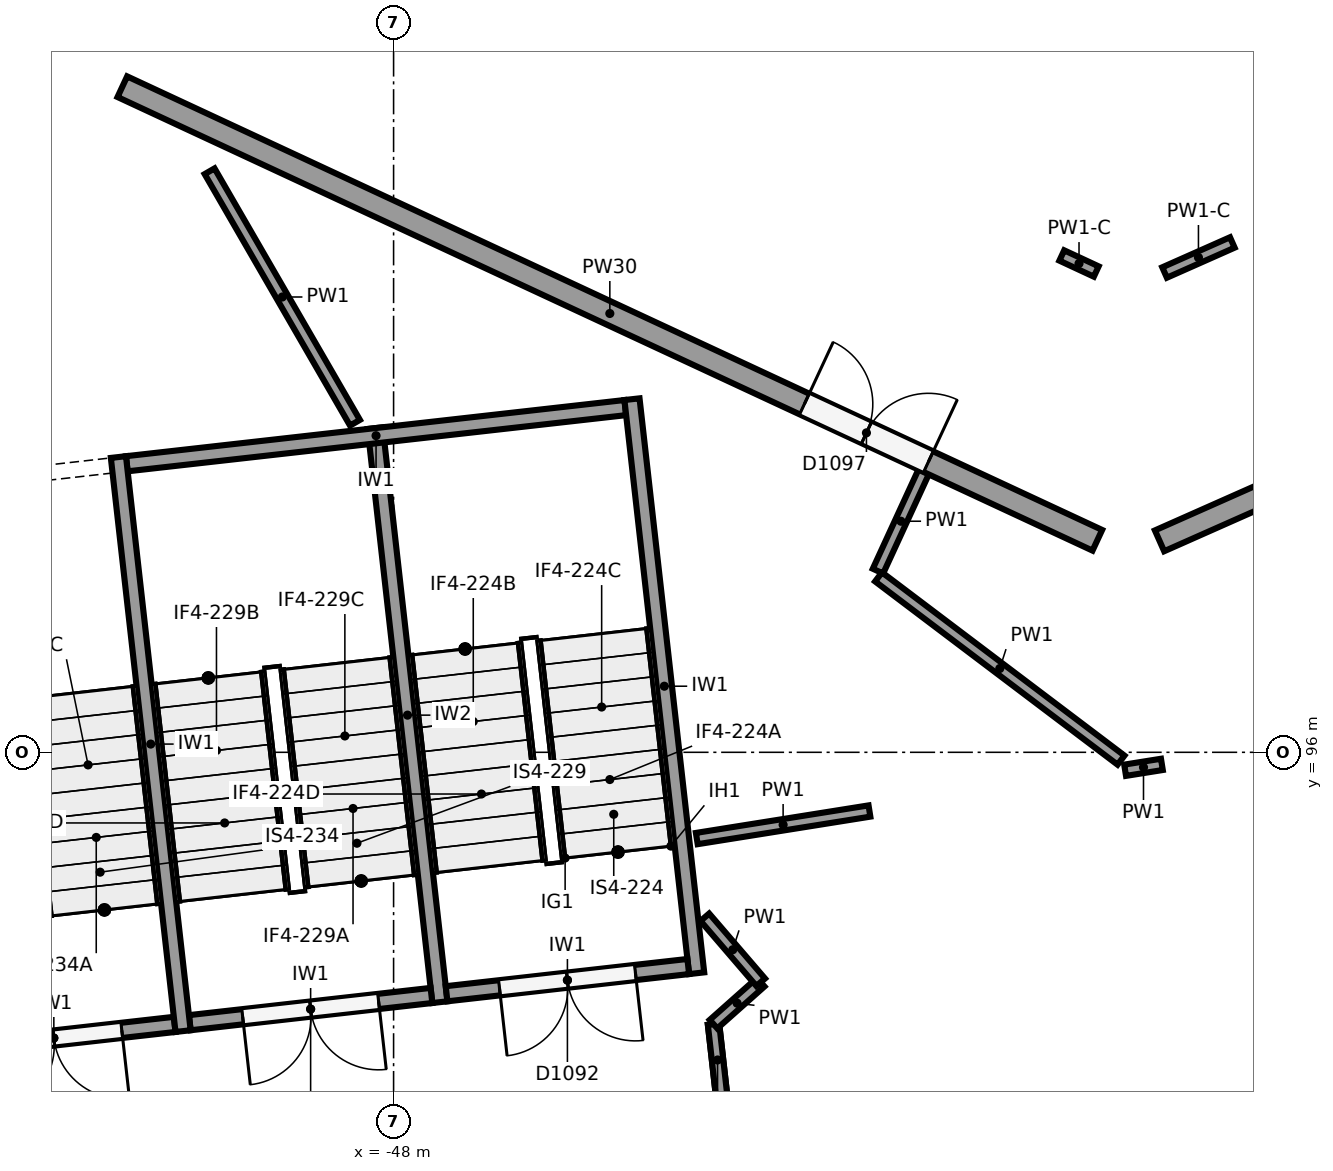
"""IFC4 building model, lengths in metres.
Left out: names, types, materials, properties, quantities, classifications, styles, units other than length and angle.
Written with IfcOpenShell. Run it as: python <this file> out.ifc"""

import sys

from ifc_helpers import new_model, si_unit, direction, frame, frame_2d, origin, origin_2d, place, context, subcontext, project, spatial, rectangle, circle, extrude, element, fill, save


model = new_model("IFC4")
c1 = context("Model", 3, precision=1e-05, world=origin(), true_north=direction((0.0, 1.0)))
c2 = subcontext(c1, "Body", "Model", "MODEL_VIEW")
j1 = project(units=[si_unit("LENGTHUNIT", "METRE"), si_unit("PLANEANGLEUNIT", "RADIAN")], contexts=[c1])
p1 = place(None, origin())
s1 = spatial("IfcSite", under=j1, at=p1, CompositionType="ELEMENT")
p2 = place(p1, origin())
s2 = spatial("IfcBuilding", under=s1, at=p2, CompositionType="ELEMENT")
p3 = place(p2, frame((0.0, 0.0, 12.0)))
s3 = spatial("IfcBuildingStorey", under=s2, at=p3, CompositionType="ELEMENT", Elevation=12.0)
p4 = place(p3, frame((-38.333, 98.6, 0.0), z_axis=(0.0, 0.0, 1.0), x_axis=(1.0, 0.0, 0.0)))
e1 = element("IfcColumn", 1, at=p4, inside=s3, PredefinedType="COLUMN", context=c2, shape_type="SweptSolid", body=[
    extrude(circle(Radius=0.45, at=origin_2d()), origin(), (0.0, 0.0, 1.0), 6.0),
])
p5 = place(p3, frame((-44.683, 91.091, 0.0), z_axis=(0.0, 0.0, 1.0), x_axis=(1.0, 0.0, 0.0)))
e2 = element("IfcColumn", 2, at=p5, inside=s3, PredefinedType="COLUMN", context=c2, shape_type="SweptSolid", body=[
    extrude(circle(Radius=0.55, at=origin_2d()), origin(), (0.0, 0.0, 1.0), 6.0),
])
p6 = place(p3, frame((-52.203, 105.052, 0.0), z_axis=(0.0, 0.0, 1.0), x_axis=(1.0, 0.0, 0.0)))
e3 = element("IfcColumn", 3, at=p6, inside=s3, PredefinedType="COLUMN", context=c2, shape_type="SweptSolid", body=[
    extrude(circle(Radius=0.7, at=origin_2d()), origin(), (0.0, 0.0, 1.0), 6.0),
])
p7 = place(p3, frame((-38.333, 102.6, 0.0), z_axis=(0.0, 0.0, 1.0), x_axis=(1.0, 0.0, 0.0)))
e4 = element("IfcColumn", 4, at=p7, inside=s3, PredefinedType="COLUMN", context=c2, shape_type="SweptSolid", body=[
    extrude(circle(Radius=0.4, at=origin_2d()), origin(), (0.0, 0.0, 1.0), 6.0),
])
p8 = place(p3, frame((-37.922, 98.782, 0.0), z_axis=(0.0, 0.0, 1.0), x_axis=(0.914138897099, 0.405401130748, 0.0)))
e5 = element("IfcWall", 5, at=p8, inside=s3, PredefinedType="SOLIDWALL", context=c2, shape_type="SweptSolid", body=[
    extrude(rectangle(XDim=15.824, YDim=0.3, at=frame_2d((7.912, 0.0))), origin(), (0.0, 0.0, 1.0), 4.35),
])
p9 = place(p3, frame((-51.569, 104.757, 0.0), z_axis=(0.0, 0.0, 1.0), x_axis=(0.906698705786, -0.421778919491, 0.0)))
e6 = element("IfcWall", 6, at=p9, inside=s3, PredefinedType="SOLIDWALL", context=c2, shape_type="SweptSolid", body=[
    extrude(rectangle(XDim=14.148, YDim=0.3, at=frame_2d((7.074, 0.0))), origin(), (0.0, 0.0, 1.0), 4.35),
])
p10 = place(p9, frame((9.897, 0.0, 0.0)))
e7 = element("IfcOpeningElement", 7, at=p10, cuts=e6, PredefinedType="OPENING", context=c2, shape_type="SweptSolid", body=[
    extrude(rectangle(XDim=1.8, YDim=2.4, at=frame_2d((0.9, 1.2))), frame((0.0, 0.16, 0.0), z_axis=(0.0, -1.0, 0.0), x_axis=(1.0, 0.0, 0.0)), (0.0, 0.0, 1.0), 0.32),
])
p11 = place(p3, frame((-44.863, 100.646, 0.0), z_axis=(0.0, 0.0, 1.0), x_axis=(0.111951003472, -0.993713727802, 0.0)))
e8 = element("IfcWall", 8, at=p11, inside=s3, PredefinedType="SHEAR", context=c2, shape_type="SweptSolid", body=[
    extrude(rectangle(XDim=7.6, YDim=0.2, at=frame_2d((3.8, 0.0))), origin(), (0.0, 0.0, 1.0), 5.65),
])
p12 = place(p3, frame((-51.621, 99.885, 0.0), z_axis=(0.0, 0.0, 1.0), x_axis=(0.111947429915, -0.993714130389, 0.0)))
e9 = element("IfcWall", 9, at=p12, inside=s3, PredefinedType="SHEAR", context=c2, shape_type="SweptSolid", body=[
    extrude(rectangle(XDim=7.6, YDim=0.2, at=frame_2d((3.8, 0.0))), origin(), (0.0, 0.0, 1.0), 5.65),
])
for number, where, z_axis, x_axis in (
    (10, (-44.951, 100.535, 0.0), (0.0, 0.0, 1.0), (-0.994, -0.112, 0.0)),
    (11, (-51.709, 99.774, 0.0), (0.0, 0.0, 1.0), (-0.994, -0.112, 0.0)),
):
    element("IfcWall", number, at=place(p3, frame(where, z_axis=z_axis, x_axis=x_axis)), inside=s3, PredefinedType="SHEAR", context=c2, shape_type="SweptSolid", body=[
        extrude(rectangle(XDim=6.6, YDim=0.2, at=frame_2d((3.3, 0.0))), origin(), (0.0, 0.0, 1.0), 5.65),
    ])
p13 = place(p3, frame((-48.242, 100.265, 0.0), z_axis=(0.0, 0.0, 1.0), x_axis=(0.111954577255, -0.993713325176, 0.0)))
e12 = element("IfcWall", 12, at=p13, inside=s3, PredefinedType="SHEAR", context=c2, shape_type="SweptSolid", body=[
    extrude(rectangle(XDim=7.6, YDim=0.2, at=frame_2d((3.8, 0.0))), origin(), (0.0, 0.0, 1.0), 5.65),
])
p14 = place(p3, frame((-44.123, 93.182, 0.0), z_axis=(0.0, 0.0, 1.0), x_axis=(-0.993717005286, -0.11192190762, 0.0)))
e13 = element("IfcWall", 13, at=p14, inside=s3, PredefinedType="SHEAR", context=c2, shape_type="SweptSolid", body=[
    extrude(rectangle(XDim=3.2, YDim=0.2, at=frame_2d((1.6, 0.0))), origin(), (0.0, 0.0, 1.0), 5.65),
])
p15 = place(p14, frame((0.7, 0.0, 0.0)))
e14 = element("IfcOpeningElement", 14, at=p15, cuts=e13, PredefinedType="OPENING", context=c2, shape_type="SweptSolid", body=[
    extrude(rectangle(XDim=1.8, YDim=2.1, at=frame_2d((0.9, 1.05))), frame((0.0, 0.11, 0.0), z_axis=(0.0, -1.0, 0.0), x_axis=(1.0, 0.0, 0.0)), (0.0, 0.0, 1.0), 0.22),
])
p16 = place(p3, frame((-47.502, 92.801, 0.0), z_axis=(0.0, 0.0, 1.0), x_axis=(-0.993707560215, -0.112005735442, 0.0)))
e15 = element("IfcWall", 15, at=p16, inside=s3, PredefinedType="SHEAR", context=c2, shape_type="SweptSolid", body=[
    extrude(rectangle(XDim=3.2, YDim=0.2, at=frame_2d((1.6, 0.0))), origin(), (0.0, 0.0, 1.0), 5.65),
])
p17 = place(p16, frame((0.7, 0.0, 0.0)))
e16 = element("IfcOpeningElement", 16, at=p17, cuts=e15, PredefinedType="OPENING", context=c2, shape_type="SweptSolid", body=[
    extrude(rectangle(XDim=1.8, YDim=2.1, at=frame_2d((0.9, 1.05))), frame((0.0, 0.11, 0.0), z_axis=(0.0, -1.0, 0.0), x_axis=(1.0, 0.0, 0.0)), (0.0, 0.0, 1.0), 0.22),
])
p18 = place(p3, frame((-50.88, 92.42, 0.0), z_axis=(0.0, 0.0, 1.0), x_axis=(-0.993707560215, -0.112005735442, 0.0)))
e17 = element("IfcWall", 17, at=p18, inside=s3, PredefinedType="SHEAR", context=c2, shape_type="SweptSolid", body=[
    extrude(rectangle(XDim=3.2, YDim=0.2, at=frame_2d((1.6, 0.0))), origin(), (0.0, 0.0, 1.0), 5.65),
])
p19 = place(p18, frame((0.7, 0.0, 0.0)))
e18 = element("IfcOpeningElement", 18, at=p19, cuts=e17, PredefinedType="OPENING", context=c2, shape_type="SweptSolid", body=[
    extrude(rectangle(XDim=1.8, YDim=2.1, at=frame_2d((0.9, 1.05))), frame((0.0, 0.11, 0.0), z_axis=(0.0, -1.0, 0.0), x_axis=(1.0, 0.0, 0.0)), (0.0, 0.0, 1.0), 0.22),
])
p20 = place(p3, frame((-48.508, 100.336, 0.0), z_axis=(0.0, 0.0, 1.0), x_axis=(-0.500439359674, 0.865771590715, 0.0)))
e19 = element("IfcWall", 19, at=p20, inside=s3, PredefinedType="PARTITIONING", context=c2, shape_type="SweptSolid", body=[
    extrude(rectangle(XDim=3.822, YDim=0.15, at=frame_2d((1.911, 0.0))), origin(), (0.0, 0.0, 1.0), 5.65),
])
p21 = place(p3, frame((-37.891, 95.841, 0.0), z_axis=(0.0, 0.0, 1.0), x_axis=(-0.987539881519, -0.157368937247, 0.0)))
e20 = element("IfcWall", 20, at=p21, inside=s3, PredefinedType="PARTITIONING", context=c2, shape_type="SweptSolid", body=[
    extrude(rectangle(XDim=0.49, YDim=0.15, at=frame_2d((0.245, 0.0))), origin(), (0.0, 0.0, 1.0), 5.65),
])
p22 = place(p3, frame((-36.965, 102.708, 0.0), z_axis=(0.0, 0.0, 1.0), x_axis=(-0.914193086295, -0.4052789175, 0.0)))
e21 = element("IfcWall", 21, at=p22, inside=s3, PredefinedType="PARTITIONING", context=c2, shape_type="SweptSolid", body=[
    extrude(rectangle(XDim=0.975, YDim=0.15, at=frame_2d((0.488, 0.0))), origin(), (0.0, 0.0, 1.0), 5.55),
])
p23 = place(p3, frame((-38.755, 102.325, 0.0), z_axis=(0.0, 0.0, 1.0), x_axis=(-0.906755828453, 0.421656101067, 0.0)))
e22 = element("IfcWall", 22, at=p23, inside=s3, PredefinedType="PARTITIONING", context=c2, shape_type="SweptSolid", body=[
    extrude(rectangle(XDim=0.5, YDim=0.15, at=frame_2d((0.25, 0.0))), origin(), (0.0, 0.0, 1.0), 5.55),
])
p24 = place(p3, frame((-38.429, 95.897, 0.0), z_axis=(0.0, 0.0, 1.0), x_axis=(-0.797833387107, 0.602878002931, 0.0)))
e23 = element("IfcWall", 23, at=p24, inside=s3, PredefinedType="PARTITIONING", context=c2, shape_type="SweptSolid", body=[
    extrude(rectangle(XDim=3.999, YDim=0.15, at=frame_2d((1.999, 0.0))), origin(), (0.0, 0.0, 1.0), 5.65),
])
p25 = place(p3, frame((-41.627, 98.384, 0.0), z_axis=(0.0, 0.0, 1.0), x_axis=(0.418061745586, 0.908418613238, 0.0)))
e24 = element("IfcWall", 24, at=p25, inside=s3, PredefinedType="PARTITIONING", context=c2, shape_type="SweptSolid", body=[
    extrude(rectangle(XDim=1.445, YDim=0.15, at=frame_2d((0.723, 0.0))), origin(), (0.0, 0.0, 1.0), 5.65),
])
p26 = place(p3, frame((-41.739, 95.228, 0.0), z_axis=(0.0, 0.0, 1.0), x_axis=(-0.987519978733, -0.157493782745, 0.0)))
e25 = element("IfcWall", 25, at=p26, inside=s3, PredefinedType="PARTITIONING", context=c2, shape_type="SweptSolid", body=[
    extrude(rectangle(XDim=2.301, YDim=0.15, at=frame_2d((1.15, 0.0))), origin(), (0.0, 0.0, 1.0), 5.65),
])
p27 = place(p3, frame((-43.154, 86.767, 0.0), z_axis=(0.0, 0.0, 1.0), x_axis=(-0.111890590311, 0.993720532041, 0.0)))
e26 = element("IfcWall", 26, at=p27, inside=s3, PredefinedType="PARTITIONING", context=c2, shape_type="SweptSolid", body=[
    extrude(rectangle(XDim=5.693, YDim=0.15, at=frame_2d((2.846, 0.0))), origin(), (0.0, 0.0, 1.0), 4.55),
])
p28 = place(p27, frame((2.05, 0.0, 0.0)))
e27 = element("IfcOpeningElement", 27, at=p28, cuts=e26, PredefinedType="OPENING", context=c2, shape_type="SweptSolid", body=[
    extrude(rectangle(XDim=1.8, YDim=2.1, at=frame_2d((0.9, 1.05))), frame((0.0, 0.085, 0.0), z_axis=(0.0, -1.0, 0.0), x_axis=(1.0, 0.0, 0.0)), (0.0, 0.0, 1.0), 0.17),
])
p29 = place(p3, frame((-43.685, 91.481, 4.55), z_axis=(0.0, 0.0, 1.0), x_axis=(-0.111674075876, 0.99374488717, 0.0)))
e28 = element("IfcWall", 28, at=p29, inside=s3, PredefinedType="PARTITIONING", context=c2, shape_type="SweptSolid", body=[
    extrude(rectangle(XDim=0.949, YDim=0.15, at=frame_2d((0.474, 0.0))), origin(), (0.0, 0.0, 1.0), 1.1),
])
p30 = place(p3, frame((-43.791, 92.424, 0.0), z_axis=(0.0, 0.0, 1.0), x_axis=(0.747490432018, 0.664272575109, 0.0)))
e29 = element("IfcWall", 29, at=p30, inside=s3, PredefinedType="PARTITIONING", context=c2, shape_type="SweptSolid", body=[
    extrude(rectangle(XDim=0.83, YDim=0.15, at=frame_2d((0.415, 0.0))), origin(), (0.0, 0.0, 1.0), 5.65),
])
p31 = place(p3, frame((-43.17, 92.975, 0.0), z_axis=(0.0, 0.0, 1.0), x_axis=(-0.651825129524, 0.75836930352, 0.0)))
e30 = element("IfcWall", 30, at=p31, inside=s3, PredefinedType="PARTITIONING", context=c2, shape_type="SweptSolid", body=[
    extrude(rectangle(XDim=1.127, YDim=0.15, at=frame_2d((0.564, 0.0))), origin(), (0.0, 0.0, 1.0), 5.65),
])
p32 = place(p10, origin())
e31 = element("IfcDoor", 31, at=p32, inside=s3, OperationType="DOUBLE_DOOR_SINGLE_SWING", PredefinedType="DOOR", context=c2, shape_type="SweptSolid", body=[
    extrude(rectangle(XDim=1.8, YDim=2.4, at=frame_2d((0.9, 1.2))), frame((0.0, 0.025, 0.0), z_axis=(0.0, -1.0, 0.0), x_axis=(1.0, 0.0, 0.0)), (0.0, 0.0, 1.0), 0.05),
])
fill(e7, e31)
p33 = place(p15, origin())
e32 = element("IfcDoor", 32, at=p33, inside=s3, OperationType="DOUBLE_DOOR_SINGLE_SWING", PredefinedType="DOOR", context=c2, shape_type="SweptSolid", body=[
    extrude(rectangle(XDim=1.8, YDim=2.1, at=frame_2d((0.9, 1.05))), frame((0.0, 0.025, 0.0), z_axis=(0.0, -1.0, 0.0), x_axis=(1.0, 0.0, 0.0)), (0.0, 0.0, 1.0), 0.05),
])
fill(e14, e32)
p34 = place(p17, origin())
e33 = element("IfcDoor", 33, at=p34, inside=s3, OperationType="DOUBLE_DOOR_SINGLE_SWING", PredefinedType="DOOR", context=c2, shape_type="SweptSolid", body=[
    extrude(rectangle(XDim=1.8, YDim=2.1, at=frame_2d((0.9, 1.05))), frame((0.0, 0.025, 0.0), z_axis=(0.0, -1.0, 0.0), x_axis=(1.0, 0.0, 0.0)), (0.0, 0.0, 1.0), 0.05),
])
fill(e16, e33)
p35 = place(p19, origin())
e34 = element("IfcDoor", 34, at=p35, inside=s3, OperationType="DOUBLE_DOOR_SINGLE_SWING", PredefinedType="DOOR", context=c2, shape_type="SweptSolid", body=[
    extrude(rectangle(XDim=1.8, YDim=2.1, at=frame_2d((0.9, 1.05))), frame((0.0, 0.025, 0.0), z_axis=(0.0, -1.0, 0.0), x_axis=(1.0, 0.0, 0.0)), (0.0, 0.0, 1.0), 0.05),
])
fill(e18, e34)
save(model, sys.argv[1])
